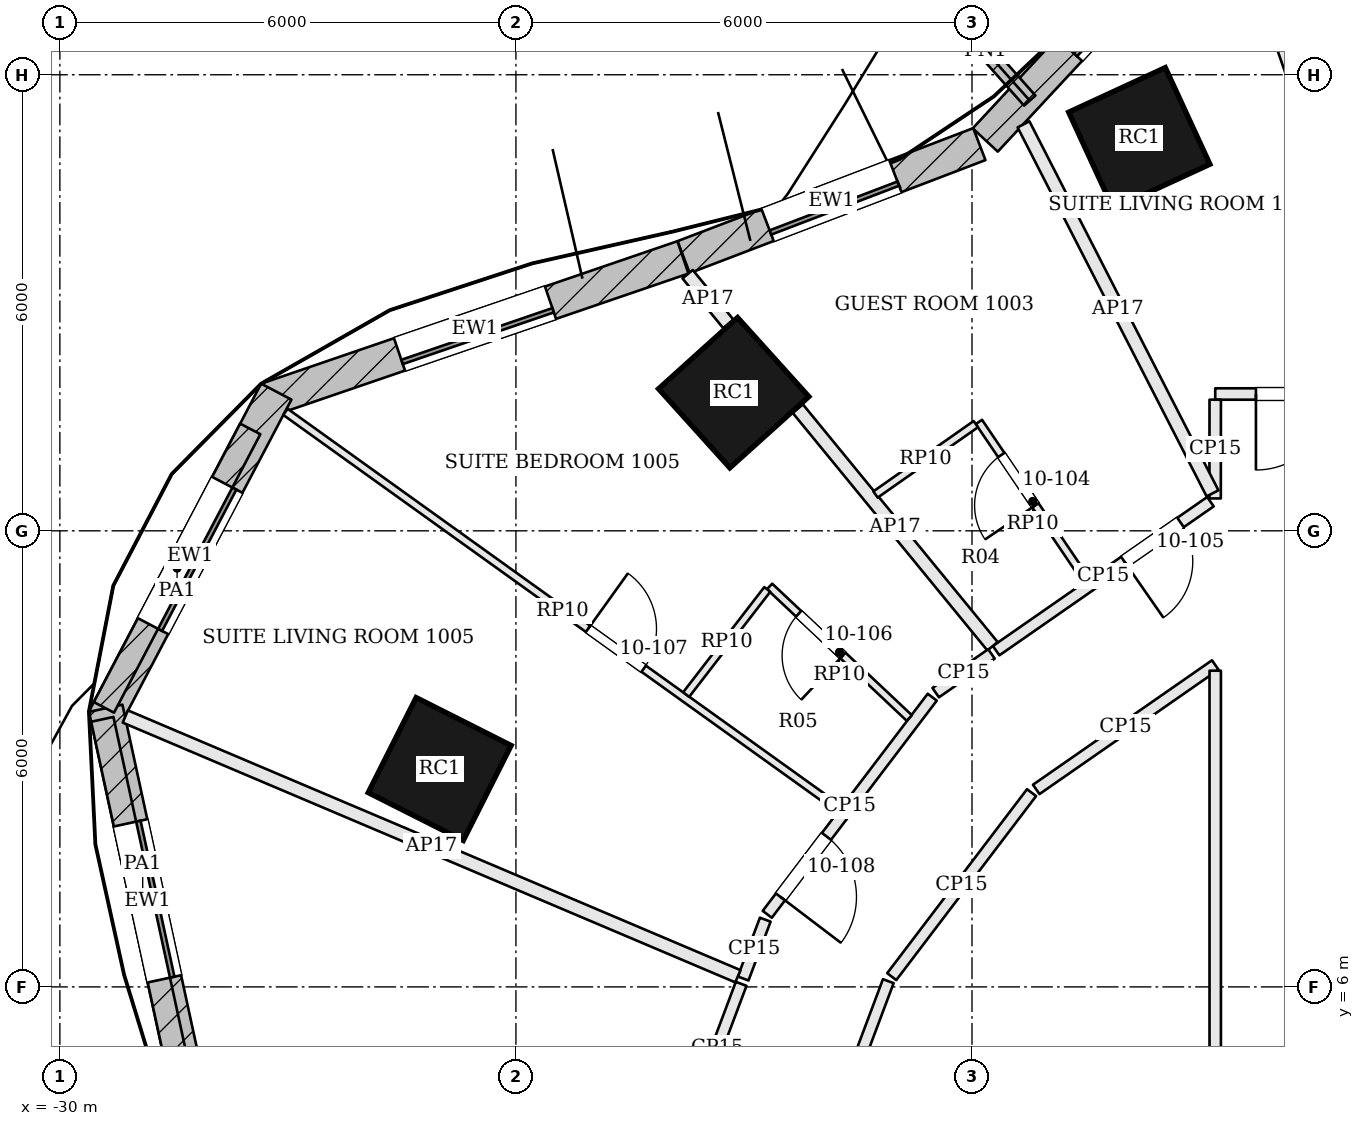
"""IFC4 building model, lengths in metres.
Left out: names, types, materials, properties, quantities, classifications, styles, units other than length and angle.
Written with IfcOpenShell. Run it as: python <this file> out.ifc"""

import sys

from ifc_helpers import new_model, si_unit, direction, frame, frame_2d, origin, origin_2d, place, context, subcontext, project, spatial, rectangle, extrude, element, fill, save


model = new_model("IFC4")
c1 = context("Model", 3, precision=1e-05, world=origin(), true_north=direction((0.0, 1.0)))
c2 = subcontext(c1, "Body", "Model", "MODEL_VIEW")
j1 = project(units=[si_unit("LENGTHUNIT", "METRE"), si_unit("PLANEANGLEUNIT", "RADIAN")], contexts=[c1])
p1 = place(None, origin())
s1 = spatial("IfcSite", under=j1, at=p1, CompositionType="ELEMENT")
p2 = place(p1, origin())
s2 = spatial("IfcBuilding", under=s1, at=p2, CompositionType="ELEMENT")
p3 = place(p2, frame((0.0, 0.0, 51.9)))
s3 = spatial("IfcBuildingStorey", under=s2, at=p3, CompositionType="ELEMENT", Elevation=51.9)
for number, where, z_axis, x_axis in (
    (1, (-15.799, 17.165, 0.0), (0.0, 0.0, 1.0), (-0.908, -0.419, 0.0)),
    (2, (-21.135, 13.817, 0.0), (0.0, 0.0, 1.0), (-0.743, -0.67, 0.0)),
    (3, (-25.003, 8.866, 0.0), (0.0, 0.0, 1.0), (-0.45, -0.893, 0.0)),
):
    element("IfcColumn", number, at=place(p3, frame(where, z_axis=z_axis, x_axis=x_axis)), inside=s3, PredefinedType="COLUMN", context=c2, shape_type="SweptSolid", body=[
        extrude(rectangle(XDim=1.4, YDim=1.4, at=origin_2d()), origin(), (0.0, 0.0, 1.0), 3.6),
    ])
p4 = place(p3, frame((-14.177, 21.066, 0.0), z_axis=(0.0, 0.0, 1.0), x_axis=(-0.680847709714, -0.732425010617, 0.0)))
e4 = element("IfcWall", 4, at=p4, inside=s3, PredefinedType="SOLIDWALL", context=c2, shape_type="SweptSolid", body=[
    extrude(rectangle(XDim=5.358, YDim=0.45, at=frame_2d((2.679, 0.0))), origin(), (0.0, 0.0, 1.0), 3.4),
])
p5 = place(p4, frame((1.629, 0.0, 0.9)))
e5 = element("IfcOpeningElement", 5, at=p5, cuts=e4, PredefinedType="OPENING", context=c2, shape_type="SweptSolid", body=[
    extrude(rectangle(XDim=2.1, YDim=2.0, at=frame_2d((1.05, 1.0))), frame((0.0, 0.235, 0.0), z_axis=(0.0, -1.0, 0.0), x_axis=(1.0, 0.0, 0.0)), (0.0, 0.0, 1.0), 0.47),
])
p6 = place(p3, frame((-17.903, 17.087, 0.0), z_axis=(0.0, 0.0, 1.0), x_axis=(-0.934145554025, -0.356892258105, 0.0)))
e6 = element("IfcWall", 6, at=p6, inside=s3, PredefinedType="SOLIDWALL", context=c2, shape_type="SweptSolid", body=[
    extrude(rectangle(XDim=4.165, YDim=0.45, at=frame_2d((2.082, 0.0))), origin(), (0.0, 0.0, 1.0), 3.4),
])
p7 = place(p6, frame((1.182, 0.0, 0.9)))
e7 = element("IfcOpeningElement", 7, at=p7, cuts=e6, PredefinedType="OPENING", context=c2, shape_type="SweptSolid", body=[
    extrude(rectangle(XDim=1.8, YDim=2.0, at=frame_2d((0.9, 1.0))), frame((0.0, 0.235, 0.0), z_axis=(0.0, -1.0, 0.0), x_axis=(1.0, 0.0, 0.0)), (0.0, 0.0, 1.0), 0.47),
])
p8 = place(p3, frame((-21.803, 15.597, 0.0), z_axis=(0.0, 0.0, 1.0), x_axis=(-0.946115314877, -0.323829910532, 0.0)))
e8 = element("IfcWall", 8, at=p8, inside=s3, PredefinedType="SOLIDWALL", context=c2, shape_type="SweptSolid", body=[
    extrude(rectangle(XDim=5.782, YDim=0.45, at=frame_2d((2.891, 0.0))), origin(), (0.0, 0.0, 1.0), 3.4),
])
p9 = place(p8, frame((1.841, 0.0, 0.9)))
e9 = element("IfcOpeningElement", 9, at=p9, cuts=e8, PredefinedType="OPENING", context=c2, shape_type="SweptSolid", body=[
    extrude(rectangle(XDim=2.1, YDim=2.0, at=frame_2d((1.05, 1.0))), frame((0.0, 0.235, 0.0), z_axis=(0.0, -1.0, 0.0), x_axis=(1.0, 0.0, 0.0)), (0.0, 0.0, 1.0), 0.47),
])
p10 = place(p3, frame((-27.153, 13.831, 0.0), z_axis=(0.0, 0.0, 1.0), x_axis=(-0.465165872942, -0.885223537108, 0.0)))
e10 = element("IfcWall", 10, at=p10, inside=s3, PredefinedType="SOLIDWALL", context=c2, shape_type="SweptSolid", body=[
    extrude(rectangle(XDim=4.871, YDim=0.45, at=frame_2d((2.436, 0.0))), origin(), (0.0, 0.0, 1.0), 3.4),
])
p11 = place(p10, frame((1.385, 0.0, 0.9)))
e11 = element("IfcOpeningElement", 11, at=p11, cuts=e10, PredefinedType="OPENING", context=c2, shape_type="SweptSolid", body=[
    extrude(rectangle(XDim=2.1, YDim=2.0, at=frame_2d((1.05, 1.0))), frame((0.0, 0.235, 0.0), z_axis=(0.0, -1.0, 0.0), x_axis=(1.0, 0.0, 0.0)), (0.0, 0.0, 1.0), 0.47),
])
p12 = place(p3, frame((-29.397, 9.666, 0.0), z_axis=(0.0, 0.0, 1.0), x_axis=(0.211962455994, -0.977277809657, 0.0)))
e12 = element("IfcWall", 12, at=p12, inside=s3, PredefinedType="SOLIDWALL", context=c2, shape_type="SweptSolid", body=[
    extrude(rectangle(XDim=5.186, YDim=0.45, at=frame_2d((2.593, 0.0))), origin(), (0.0, 0.0, 1.0), 3.4),
])
p13 = place(p12, frame((1.543, 0.0, 0.9)))
e13 = element("IfcOpeningElement", 13, at=p13, cuts=e12, PredefinedType="OPENING", context=c2, shape_type="SweptSolid", body=[
    extrude(rectangle(XDim=2.1, YDim=2.0, at=frame_2d((1.05, 1.0))), frame((0.0, 0.235, 0.0), z_axis=(0.0, -1.0, 0.0), x_axis=(1.0, 0.0, 0.0)), (0.0, 0.0, 1.0), 0.47),
])
p14 = place(p3, frame((-17.24, 17.66, 0.0), z_axis=(0.0, 0.0, 1.0), x_axis=(-0.664017424016, 0.747717099312, 0.0)))
e14 = element("IfcWall", 14, at=p14, inside=s3, PredefinedType="SOLIDWALL", context=c2, shape_type="SweptSolid", body=[
    extrude(rectangle(XDim=1.75, YDim=0.2, at=frame_2d((0.875, 0.0))), origin(), (0.0, 0.0, 1.0), 3.4),
])
p15 = place(p3, frame((-27.495, 13.341, 3.6), z_axis=(0.0, 0.0, 1.0), x_axis=(-0.46519687666, -0.88520724463, 0.0)))
e15 = element("IfcWall", 15, at=p15, inside=s3, PredefinedType="PARAPET", context=c2, shape_type="SweptSolid", body=[
    extrude(rectangle(XDim=4.139, YDim=0.3, at=frame_2d((2.069, 0.0))), origin(), (0.0, 0.0, 1.0), 1.1),
])
p16 = place(p3, frame((-29.442, 9.52, 3.6), z_axis=(0.0, 0.0, 1.0), x_axis=(0.211918382355, -0.977287367779, 0.0)))
e16 = element("IfcWall", 16, at=p16, inside=s3, PredefinedType="PARAPET", context=c2, shape_type="SweptSolid", body=[
    extrude(rectangle(XDim=5.016, YDim=0.3, at=frame_2d((2.508, 0.0))), origin(), (0.0, 0.0, 1.0), 1.1),
])
p17 = place(p3, frame((-11.464, 13.8, 0.0), z_axis=(0.0, 0.0, 1.0), x_axis=(-1.0, 0.0, 0.0)))
e17 = element("IfcWall", 17, at=p17, inside=s3, PredefinedType="PARTITIONING", context=c2, shape_type="SweptSolid", body=[
    extrude(rectangle(XDim=3.336, YDim=0.15, at=frame_2d((1.668, 0.0))), origin(), (0.0, 0.0, 1.0), 2.68),
])
p18 = place(p17, frame((1.8, 0.0, 0.0)))
e18 = element("IfcOpeningElement", 18, at=p18, cuts=e17, PredefinedType="OPENING", context=c2, shape_type="SweptSolid", body=[
    extrude(rectangle(XDim=1.0, YDim=2.1, at=frame_2d((0.5, 1.05))), frame((0.0, 0.085, 0.0), z_axis=(0.0, -1.0, 0.0), x_axis=(1.0, 0.0, 0.0)), (0.0, 0.0, 1.0), 0.17),
])
p19 = place(p3, frame((-14.8, 13.725, 0.0), z_axis=(0.0, 0.0, 1.0), x_axis=(-0.001127606876, -0.999999364251, 0.0)))
e19 = element("IfcWall", 19, at=p19, inside=s3, PredefinedType="PARTITIONING", context=c2, shape_type="SweptSolid", body=[
    extrude(rectangle(XDim=1.299, YDim=0.15, at=frame_2d((0.649, 0.0))), origin(), (0.0, 0.0, 1.0), 2.68),
])
p20 = place(p3, frame((-17.322, 17.347, 0.0), z_axis=(0.0, 0.0, 1.0), x_axis=(0.455858572344, -0.890052224322, 0.0)))
e20 = element("IfcWall", 20, at=p20, inside=s3, PredefinedType="PARTITIONING", context=c2, shape_type="SweptSolid", body=[
    extrude(rectangle(XDim=5.454, YDim=0.175, at=frame_2d((2.727, 0.0))), origin(), (0.0, 0.0, 1.0), 2.68),
])
p21 = place(p3, frame((-14.863, 12.383, 0.0), z_axis=(0.0, 0.0, 1.0), x_axis=(-0.821141348731, -0.570724877155, 0.0)))
e21 = element("IfcWall", 21, at=p21, inside=s3, PredefinedType="PARTITIONING", context=c2, shape_type="SweptSolid", body=[
    extrude(rectangle(XDim=3.434, YDim=0.15, at=frame_2d((1.717, 0.0))), origin(), (0.0, 0.0, 1.0), 2.68),
])
p22 = place(p21, frame((0.479, 0.0, 0.0)))
e22 = element("IfcOpeningElement", 22, at=p22, cuts=e21, PredefinedType="OPENING", context=c2, shape_type="SweptSolid", body=[
    extrude(rectangle(XDim=0.9, YDim=2.4, at=frame_2d((0.45, 1.2))), frame((0.0, 0.085, 0.0), z_axis=(0.0, -1.0, 0.0), x_axis=(1.0, 0.0, 0.0)), (0.0, 0.0, 1.0), 0.17),
])
p23 = place(p3, frame((-21.741, 15.376, 0.0), z_axis=(0.0, 0.0, 1.0), x_axis=(0.633882626289, -0.773429257327, 0.0)))
e23 = element("IfcWall", 23, at=p23, inside=s3, PredefinedType="PARTITIONING", context=c2, shape_type="SweptSolid", body=[
    extrude(rectangle(XDim=0.845, YDim=0.175, at=frame_2d((0.422, 0.0))), origin(), (0.0, 0.0, 1.0), 2.68),
])
p24 = place(p3, frame((-20.292, 13.608, 0.0), z_axis=(0.0, 0.0, 1.0), x_axis=(0.633888862279, -0.773424146428, 0.0)))
e24 = element("IfcWall", 24, at=p24, inside=s3, PredefinedType="PARTITIONING", context=c2, shape_type="SweptSolid", body=[
    extrude(rectangle(XDim=4.042, YDim=0.175, at=frame_2d((2.021, 0.0))), origin(), (0.0, 0.0, 1.0), 2.68),
])
p25 = place(p3, frame((-17.744, 10.381, 0.0), z_axis=(0.0, 0.0, 1.0), x_axis=(-0.821127993695, -0.57074409149, 0.0)))
e25 = element("IfcWall", 25, at=p25, inside=s3, PredefinedType="PARTITIONING", context=c2, shape_type="SweptSolid", body=[
    extrude(rectangle(XDim=0.893, YDim=0.15, at=frame_2d((0.447, 0.0))), origin(), (0.0, 0.0, 1.0), 2.68),
])
p26 = place(p3, frame((-18.523, 9.811, 0.0), z_axis=(0.0, 0.0, 1.0), x_axis=(-0.605040130963, -0.796194976073, 0.0)))
e26 = element("IfcWall", 26, at=p26, inside=s3, PredefinedType="PARTITIONING", context=c2, shape_type="SweptSolid", body=[
    extrude(rectangle(XDim=3.588, YDim=0.15, at=frame_2d((1.794, 0.0))), origin(), (0.0, 0.0, 1.0), 2.68),
])
p27 = place(p26, frame((2.3, 0.0, 0.0)))
e27 = element("IfcOpeningElement", 27, at=p27, cuts=e26, PredefinedType="OPENING", context=c2, shape_type="SweptSolid", body=[
    extrude(rectangle(XDim=1.0, YDim=2.1, at=frame_2d((0.5, 1.05))), frame((0.0, 0.085, 0.0), z_axis=(0.0, -1.0, 0.0), x_axis=(1.0, 0.0, 0.0)), (0.0, 0.0, 1.0), 0.17),
])
p28 = place(p3, frame((-20.72, 6.885, 0.0), z_axis=(0.0, 0.0, 1.0), x_axis=(-0.351447073955, -0.936207751628, 0.0)))
e28 = element("IfcWall", 28, at=p28, inside=s3, PredefinedType="PARTITIONING", context=c2, shape_type="SweptSolid", body=[
    extrude(rectangle(XDim=0.827, YDim=0.15, at=frame_2d((0.413, 0.0))), origin(), (0.0, 0.0, 1.0), 2.68),
])
p29 = place(p3, frame((-29.139, 9.557, 0.0), z_axis=(0.0, 0.0, 1.0), x_axis=(0.920652865841, -0.390382249365, 0.0)))
e29 = element("IfcWall", 29, at=p29, inside=s3, PredefinedType="PARTITIONING", context=c2, shape_type="SweptSolid", body=[
    extrude(rectangle(XDim=8.754, YDim=0.175, at=frame_2d((4.377, 0.0))), origin(), (0.0, 0.0, 1.0), 2.68),
])
p30 = place(p3, frame((-21.037, 6.04, 0.0), z_axis=(0.0, 0.0, 1.0), x_axis=(-0.351451209017, -0.936206199339, 0.0)))
e30 = element("IfcWall", 30, at=p30, inside=s3, PredefinedType="PARTITIONING", context=c2, shape_type="SweptSolid", body=[
    extrude(rectangle(XDim=1.796, YDim=0.15, at=frame_2d((0.898, 0.0))), origin(), (0.0, 0.0, 1.0), 2.68),
])
p31 = place(p3, frame((-19.884, 3.99, 0.0), z_axis=(0.0, 0.0, 1.0), x_axis=(0.351423736928, 0.936216511884, 0.0)))
e31 = element("IfcWall", 31, at=p31, inside=s3, PredefinedType="PARTITIONING", context=c2, shape_type="SweptSolid", body=[
    extrude(rectangle(XDim=2.227, YDim=0.15, at=frame_2d((1.114, 0.0))), origin(), (0.0, 0.0, 1.0), 2.68),
])
p32 = place(p3, frame((-19.056, 6.135, 0.0), z_axis=(0.0, 0.0, 1.0), x_axis=(0.604999774258, 0.796225642107, 0.0)))
e32 = element("IfcWall", 32, at=p32, inside=s3, PredefinedType="PARTITIONING", context=c2, shape_type="SweptSolid", body=[
    extrude(rectangle(XDim=3.04, YDim=0.15, at=frame_2d((1.52, 0.0))), origin(), (0.0, 0.0, 1.0), 2.68),
])
p33 = place(p3, frame((-17.155, 8.598, 0.0), z_axis=(0.0, 0.0, 1.0), x_axis=(0.821087350938, 0.570802559673, 0.0)))
e33 = element("IfcWall", 33, at=p33, inside=s3, PredefinedType="PARTITIONING", context=c2, shape_type="SweptSolid", body=[
    extrude(rectangle(XDim=2.868, YDim=0.15, at=frame_2d((1.434, 0.0))), origin(), (0.0, 0.0, 1.0), 2.68),
])
p34 = place(p3, frame((-14.8, 10.16, 0.0), z_axis=(0.0, 0.0, 1.0), x_axis=(0.0, -1.0, 0.0)))
e34 = element("IfcWall", 34, at=p34, inside=s3, PredefinedType="PARTITIONING", context=c2, shape_type="SweptSolid", body=[
    extrude(rectangle(XDim=14.96, YDim=0.15, at=frame_2d((7.48, 0.0))), origin(), (0.0, 0.0, 1.0), 2.68),
])
p35 = place(p34, frame((6.542, 0.0, 0.0)))
e35 = element("IfcOpeningElement", 35, at=p35, cuts=e34, PredefinedType="OPENING", context=c2, shape_type="SweptSolid", body=[
    extrude(rectangle(XDim=1.8, YDim=2.1, at=frame_2d((0.9, 1.05))), frame((0.0, 0.085, 0.0), z_axis=(0.0, -1.0, 0.0), x_axis=(1.0, 0.0, 0.0)), (0.0, 0.0, 1.0), 0.17),
])
p36 = place(p3, frame((-14.603, 20.272, 0.0), z_axis=(0.0, 0.0, 1.0), x_axis=(0.327245485349, -0.94493935907, 0.0)))
e36 = element("IfcWall", 36, at=p36, inside=s3, PredefinedType="PARTITIONING", context=c2, shape_type="SweptSolid", body=[
    extrude(rectangle(XDim=6.774, YDim=0.1, at=frame_2d((3.387, 0.0))), origin(), (0.0, 0.0, 1.0), 2.898),
])
p37 = place(p36, frame((2.699, 0.0, 0.0)))
e37 = element("IfcOpeningElement", 37, at=p37, cuts=e36, PredefinedType="OPENING", context=c2, shape_type="SweptSolid", body=[
    extrude(rectangle(XDim=0.9, YDim=2.4, at=frame_2d((0.45, 1.2))), frame((0.0, 0.06, 0.0), z_axis=(0.0, -1.0, 0.0), x_axis=(1.0, 0.0, 0.0)), (0.0, 0.0, 1.0), 0.12),
])
p38 = place(p3, frame((-16.493, 11.342, 0.0), z_axis=(0.0, 0.0, 1.0), x_axis=(-0.560910145084, 0.827876687159, 0.0)))
e38 = element("IfcWall", 38, at=p38, inside=s3, PredefinedType="PARTITIONING", context=c2, shape_type="SweptSolid", body=[
    extrude(rectangle(XDim=2.525, YDim=0.1, at=frame_2d((1.262, 0.0))), origin(), (0.0, 0.0, 1.0), 2.898),
])
p39 = place(p38, frame((1.2, 0.0, 0.0)))
e39 = element("IfcOpeningElement", 39, at=p39, cuts=e38, PredefinedType="OPENING", context=c2, shape_type="SweptSolid", body=[
    extrude(rectangle(XDim=0.8, YDim=2.1, at=frame_2d((0.4, 1.05))), frame((0.0, 0.06, 0.0), z_axis=(0.0, -1.0, 0.0), x_axis=(1.0, 0.0, 0.0)), (0.0, 0.0, 1.0), 0.12),
])
p40 = place(p3, frame((-17.95, 13.404, 0.0), z_axis=(0.0, 0.0, 1.0), x_axis=(-0.818576684684, -0.574397259127, 0.0)))
e40 = element("IfcWall", 40, at=p40, inside=s3, PredefinedType="PARTITIONING", context=c2, shape_type="SweptSolid", body=[
    extrude(rectangle(XDim=1.612, YDim=0.1, at=frame_2d((0.806, 0.0))), origin(), (0.0, 0.0, 1.0), 2.898),
])
p41 = place(p3, frame((-27.033, 13.565, 0.0), z_axis=(0.0, 0.0, 1.0), x_axis=(0.812686383225, -0.582701332177, 0.0)))
e41 = element("IfcWall", 41, at=p41, inside=s3, PredefinedType="PARTITIONING", context=c2, shape_type="SweptSolid", body=[
    extrude(rectangle(XDim=8.975, YDim=0.1, at=frame_2d((4.488, 0.0))), origin(), (0.0, 0.0, 1.0), 2.898),
])
p42 = place(p41, frame((4.9, 0.0, 0.0)))
e42 = element("IfcOpeningElement", 42, at=p42, cuts=e41, PredefinedType="OPENING", context=c2, shape_type="SweptSolid", body=[
    extrude(rectangle(XDim=0.9, YDim=2.4, at=frame_2d((0.45, 1.2))), frame((0.0, 0.06, 0.0), z_axis=(0.0, -1.0, 0.0), x_axis=(1.0, 0.0, 0.0)), (0.0, 0.0, 1.0), 0.12),
])
p43 = place(p3, frame((-18.825, 9.538, 0.0), z_axis=(0.0, 0.0, 1.0), x_axis=(-0.728106307971, 0.685464225393, 0.0)))
e43 = element("IfcWall", 43, at=p43, inside=s3, PredefinedType="PARTITIONING", context=c2, shape_type="SweptSolid", body=[
    extrude(rectangle(XDim=2.525, YDim=0.1, at=frame_2d((1.262, 0.0))), origin(), (0.0, 0.0, 1.0), 2.898),
])
p44 = place(p43, frame((1.2, 0.0, 0.0)))
e44 = element("IfcOpeningElement", 44, at=p44, cuts=e43, PredefinedType="OPENING", context=c2, shape_type="SweptSolid", body=[
    extrude(rectangle(XDim=0.8, YDim=2.1, at=frame_2d((0.4, 1.05))), frame((0.0, 0.06, 0.0), z_axis=(0.0, -1.0, 0.0), x_axis=(1.0, 0.0, 0.0)), (0.0, 0.0, 1.0), 0.12),
])
p45 = place(p3, frame((-20.694, 11.229, 0.0), z_axis=(0.0, 0.0, 1.0), x_axis=(-0.610818482981, -0.791770661776, 0.0)))
e45 = element("IfcWall", 45, at=p45, inside=s3, PredefinedType="PARTITIONING", context=c2, shape_type="SweptSolid", body=[
    extrude(rectangle(XDim=1.746, YDim=0.1, at=frame_2d((0.873, 0.0))), origin(), (0.0, 0.0, 1.0), 2.898),
])
p46 = place(p5, origin())
e46 = element("IfcWindow", 46, at=p46, inside=s3, PartitioningType="SINGLE_PANEL", PredefinedType="WINDOW", context=c2, shape_type="SweptSolid", body=[
    extrude(rectangle(XDim=2.1, YDim=2.0, at=frame_2d((1.05, 1.0))), frame((0.0, 0.135, 0.0), z_axis=(0.0, -1.0, 0.0), x_axis=(1.0, 0.0, 0.0)), (0.0, 0.0, 1.0), 0.06),
])
fill(e5, e46)
p47 = place(p7, origin())
e47 = element("IfcWindow", 47, at=p47, inside=s3, PartitioningType="SINGLE_PANEL", PredefinedType="WINDOW", context=c2, shape_type="SweptSolid", body=[
    extrude(rectangle(XDim=1.8, YDim=2.0, at=frame_2d((0.9, 1.0))), frame((0.0, 0.135, 0.0), z_axis=(0.0, -1.0, 0.0), x_axis=(1.0, 0.0, 0.0)), (0.0, 0.0, 1.0), 0.06),
])
fill(e7, e47)
p48 = place(p9, origin())
e48 = element("IfcWindow", 48, at=p48, inside=s3, PartitioningType="SINGLE_PANEL", PredefinedType="WINDOW", context=c2, shape_type="SweptSolid", body=[
    extrude(rectangle(XDim=2.1, YDim=2.0, at=frame_2d((1.05, 1.0))), frame((0.0, 0.135, 0.0), z_axis=(0.0, -1.0, 0.0), x_axis=(1.0, 0.0, 0.0)), (0.0, 0.0, 1.0), 0.06),
])
fill(e9, e48)
p49 = place(p11, origin())
e49 = element("IfcWindow", 49, at=p49, inside=s3, PartitioningType="SINGLE_PANEL", PredefinedType="WINDOW", context=c2, shape_type="SweptSolid", body=[
    extrude(rectangle(XDim=2.1, YDim=2.0, at=frame_2d((1.05, 1.0))), frame((0.0, 0.135, 0.0), z_axis=(0.0, -1.0, 0.0), x_axis=(1.0, 0.0, 0.0)), (0.0, 0.0, 1.0), 0.06),
])
fill(e11, e49)
p50 = place(p13, origin())
e50 = element("IfcWindow", 50, at=p50, inside=s3, PartitioningType="SINGLE_PANEL", PredefinedType="WINDOW", context=c2, shape_type="SweptSolid", body=[
    extrude(rectangle(XDim=2.1, YDim=2.0, at=frame_2d((1.05, 1.0))), frame((0.0, 0.135, 0.0), z_axis=(0.0, -1.0, 0.0), x_axis=(1.0, 0.0, 0.0)), (0.0, 0.0, 1.0), 0.06),
])
fill(e13, e50)
p51 = place(p18, origin())
e51 = element("IfcDoor", 51, at=p51, inside=s3, OperationType="SINGLE_SWING_RIGHT", PredefinedType="DOOR", context=c2, shape_type="SweptSolid", body=[
    extrude(rectangle(XDim=1.0, YDim=2.1, at=frame_2d((0.5, 1.05))), frame((0.0, 0.025, 0.0), z_axis=(0.0, -1.0, 0.0), x_axis=(1.0, 0.0, 0.0)), (0.0, 0.0, 1.0), 0.05),
])
fill(e18, e51)
p52 = place(p39, origin())
e52 = element("IfcDoor", 52, at=p52, inside=s3, OperationType="SINGLE_SWING_LEFT", PredefinedType="DOOR", context=c2, shape_type="SweptSolid", body=[
    extrude(rectangle(XDim=0.8, YDim=2.1, at=frame_2d((0.4, 1.05))), frame((0.0, 0.025, 0.0), z_axis=(0.0, -1.0, 0.0), x_axis=(1.0, 0.0, 0.0)), (0.0, 0.0, 1.0), 0.05),
])
fill(e39, e52)
p53 = place(p22, origin())
e53 = element("IfcDoor", 53, at=p53, inside=s3, OperationType="SINGLE_SWING_RIGHT", PredefinedType="DOOR", context=c2, shape_type="SweptSolid", body=[
    extrude(rectangle(XDim=0.9, YDim=2.4, at=frame_2d((0.45, 1.2))), frame((0.0, 0.025, 0.0), z_axis=(0.0, -1.0, 0.0), x_axis=(1.0, 0.0, 0.0)), (0.0, 0.0, 1.0), 0.05),
])
fill(e22, e53)
p54 = place(p44, origin())
e54 = element("IfcDoor", 54, at=p54, inside=s3, OperationType="SINGLE_SWING_LEFT", PredefinedType="DOOR", context=c2, shape_type="SweptSolid", body=[
    extrude(rectangle(XDim=0.8, YDim=2.1, at=frame_2d((0.4, 1.05))), frame((0.0, 0.025, 0.0), z_axis=(0.0, -1.0, 0.0), x_axis=(1.0, 0.0, 0.0)), (0.0, 0.0, 1.0), 0.05),
])
fill(e44, e54)
p55 = place(p42, origin())
e55 = element("IfcDoor", 55, at=p55, inside=s3, OperationType="SINGLE_SWING_LEFT", PredefinedType="DOOR", context=c2, shape_type="SweptSolid", body=[
    extrude(rectangle(XDim=0.9, YDim=2.4, at=frame_2d((0.45, 1.2))), frame((0.0, 0.025, 0.0), z_axis=(0.0, -1.0, 0.0), x_axis=(1.0, 0.0, 0.0)), (0.0, 0.0, 1.0), 0.05),
])
fill(e42, e55)
p56 = place(p27, origin())
e56 = element("IfcDoor", 56, at=p56, inside=s3, OperationType="SINGLE_SWING_RIGHT", PredefinedType="DOOR", context=c2, shape_type="SweptSolid", body=[
    extrude(rectangle(XDim=1.0, YDim=2.1, at=frame_2d((0.5, 1.05))), frame((0.0, 0.025, 0.0), z_axis=(0.0, -1.0, 0.0), x_axis=(1.0, 0.0, 0.0)), (0.0, 0.0, 1.0), 0.05),
])
fill(e27, e56)
save(model, sys.argv[1])
